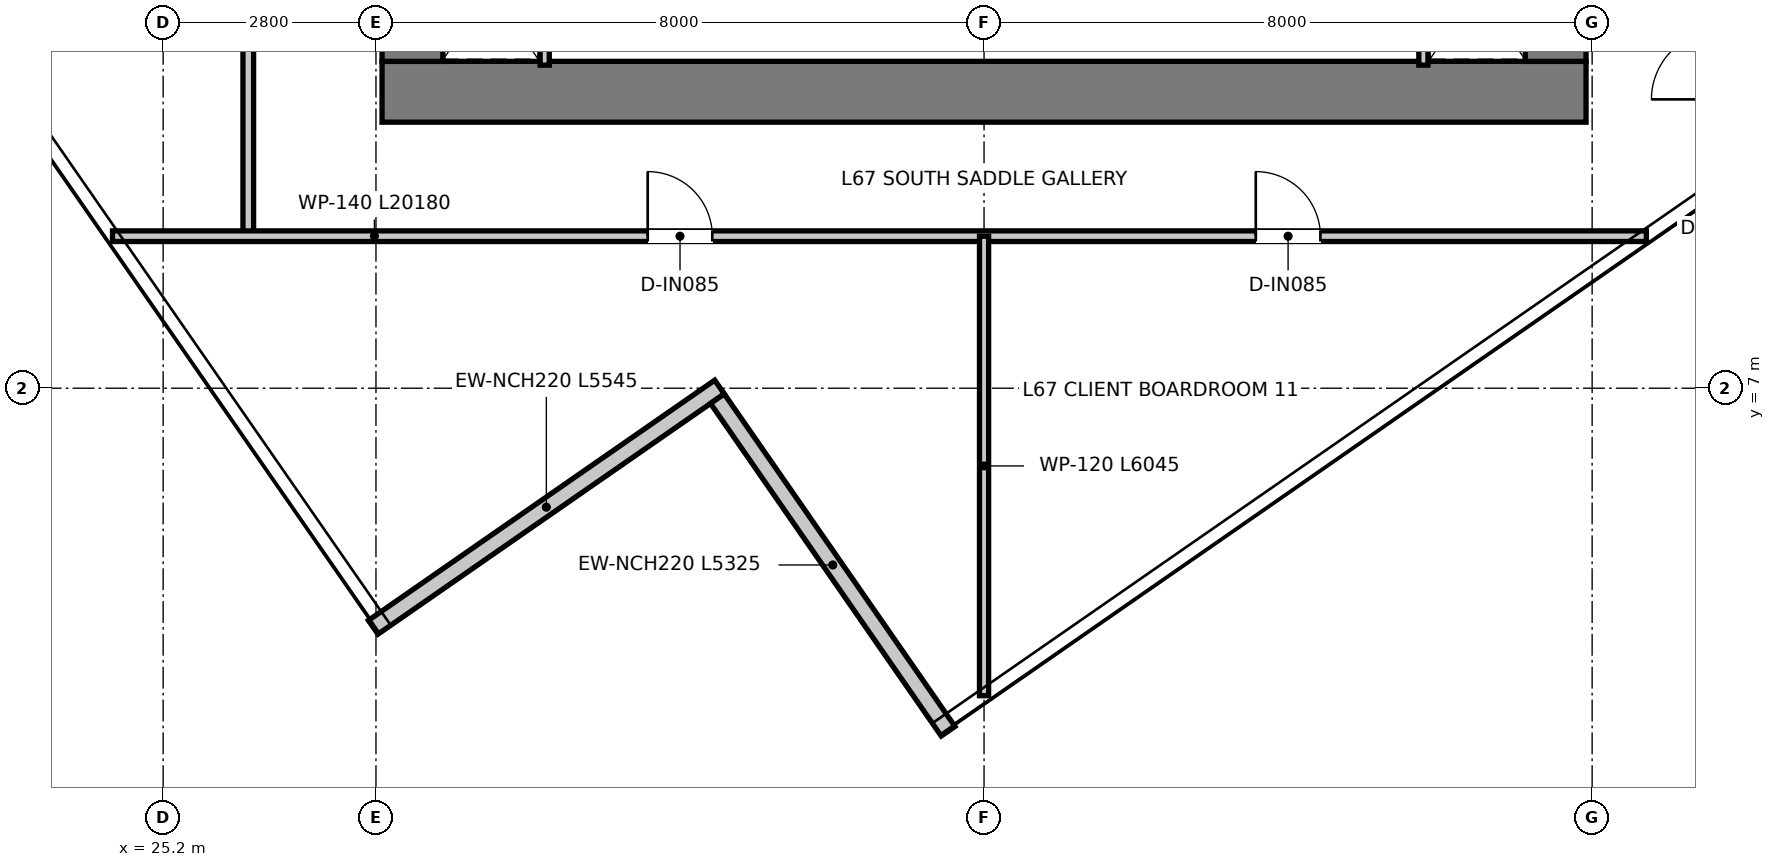
"""IFC4 building model, lengths in metres.
Left out: names, types, materials, properties, quantities, classifications, styles, units other than length and angle.
Written with IfcOpenShell. Run it as: python <this file> out.ifc"""

import sys

from ifc_helpers import new_model, si_unit, direction, frame, frame_2d, origin, place, context, subcontext, project, spatial, rectangle, extrude, element, fill, save


model = new_model("IFC4")
c1 = context("Model", 3, precision=1e-05, world=origin(), true_north=direction((0.0, 1.0)))
c2 = subcontext(c1, "Body", "Model", "MODEL_VIEW")
j1 = project(units=[si_unit("LENGTHUNIT", "METRE"), si_unit("PLANEANGLEUNIT", "RADIAN")], contexts=[c1])
p1 = place(None, origin())
s1 = spatial("IfcSite", under=j1, at=p1, CompositionType="ELEMENT")
p2 = place(p1, origin())
s2 = spatial("IfcBuilding", under=s1, at=p2, CompositionType="ELEMENT")
p3 = place(p2, frame((0.0, 0.0, 275.3)))
s3 = spatial("IfcBuildingStorey", under=s2, at=p3, CompositionType="ELEMENT", Elevation=275.3)
p4 = place(p3, frame((28.08, 10.9, 0.0), z_axis=(0.0, 0.0, 1.0), x_axis=(1.0, 0.0, 0.0)))
e1 = element("IfcWall", 1, at=p4, inside=s3, PredefinedType="SHEAR", context=c2, shape_type="SweptSolid", body=[
    extrude(rectangle(XDim=15.84, YDim=0.8, at=frame_2d((7.92, 0.0))), origin(), (0.0, 0.0, 1.0), 3.95),
])
for number, where, z_axis, x_axis in (
    (2, (28.48, 11.3, 0.0), (0.0, 0.0, 1.0), (0.0, 1.0, 0.0)),
    (3, (43.52, 11.3, 0.0), (0.0, 0.0, 1.0), (0.0, 1.0, 0.0)),
):
    element("IfcWall", number, at=place(p3, frame(where, z_axis=z_axis, x_axis=x_axis)), inside=s3, PredefinedType="SHEAR", context=c2, shape_type="SweptSolid", body=[
        extrude(rectangle(XDim=14.7, YDim=0.8, at=frame_2d((7.35, 0.0))), origin(), (0.0, 0.0, 1.0), 3.95),
    ])
p5 = place(p3, frame((27.963, 3.855, 0.0), z_axis=(0.0, 0.0, 1.0), x_axis=(0.821652918874, 0.569988141022, 0.0)))
e4 = element("IfcWall", 4, at=p5, inside=s3, PredefinedType="ELEMENTEDWALL", context=c2, shape_type="SweptSolid", body=[
    extrude(rectangle(XDim=5.545, YDim=0.22, at=frame_2d((2.772, 0.0))), origin(), (0.0, 0.0, 1.0), 3.67),
])
p6 = place(p3, frame((32.492, 6.862, 0.0), z_axis=(0.0, 0.0, 1.0), x_axis=(0.569998811791, -0.821645516361, 0.0)))
e5 = element("IfcWall", 5, at=p6, inside=s3, PredefinedType="ELEMENTEDWALL", context=c2, shape_type="SweptSolid", body=[
    extrude(rectangle(XDim=5.325, YDim=0.22, at=frame_2d((2.663, 0.0))), origin(), (0.0, 0.0, 1.0), 3.67),
])
for number, where, z_axis, x_axis in (
    (6, (30.22, 11.25, 0.0), (0.0, 0.0, 1.0), (0.0, 1.0, 0.0)),
    (7, (41.78, 11.25, 0.0), (0.0, 0.0, 1.0), (0.0, 1.0, 0.0)),
):
    element("IfcWall", number, at=place(p3, frame(where, z_axis=z_axis, x_axis=x_axis)), inside=s3, PredefinedType="PARTITIONING", context=c2, shape_type="SweptSolid", body=[
        extrude(rectangle(XDim=1.97, YDim=0.12, at=frame_2d((0.985, 0.0))), origin(), (0.0, 0.0, 1.0), 3.67),
    ])
p7 = place(p3, frame((26.32, 9.0, 0.0), z_axis=(0.0, 0.0, 1.0), x_axis=(0.0, 1.0, 0.0)))
e8 = element("IfcWall", 8, at=p7, inside=s3, PredefinedType="PARTITIONING", context=c2, shape_type="SweptSolid", body=[
    extrude(rectangle(XDim=19.66, YDim=0.14, at=frame_2d((9.83, 0.0))), origin(), (0.0, 0.0, 1.0), 3.13),
])
p8 = place(p7, frame((18.3, 0.0, 0.0)))
e9 = element("IfcOpeningElement", 9, at=p8, cuts=e8, PredefinedType="OPENING", context=c2, shape_type="SweptSolid", body=[
    extrude(rectangle(XDim=0.9, YDim=2.1, at=frame_2d((0.45, 1.05))), frame((0.0, 0.08, 0.0), z_axis=(0.0, -1.0, 0.0), x_axis=(1.0, 0.0, 0.0)), (0.0, 0.0, 1.0), 0.16),
])
p9 = place(p7, frame((9.8, 0.0, 0.0)))
e10 = element("IfcOpeningElement", 10, at=p9, cuts=e8, PredefinedType="OPENING", context=c2, shape_type="SweptSolid", body=[
    extrude(rectangle(XDim=0.9, YDim=2.1, at=frame_2d((0.45, 1.05))), frame((0.0, 0.08, 0.0), z_axis=(0.0, -1.0, 0.0), x_axis=(1.0, 0.0, 0.0)), (0.0, 0.0, 1.0), 0.16),
])
p10 = place(p7, frame((14.46, 0.0, 0.0)))
e11 = element("IfcOpeningElement", 11, at=p10, cuts=e8, PredefinedType="OPENING", context=c2, shape_type="SweptSolid", body=[
    extrude(rectangle(XDim=0.9, YDim=2.1, at=frame_2d((0.45, 1.05))), frame((0.0, 0.08, 0.0), z_axis=(0.0, -1.0, 0.0), x_axis=(1.0, 0.0, 0.0)), (0.0, 0.0, 1.0), 0.16),
])
p11 = place(p3, frame((24.534, 9.0, 0.0), z_axis=(0.0, 0.0, 1.0), x_axis=(1.0, 0.0, 0.0)))
e12 = element("IfcWall", 12, at=p11, inside=s3, PredefinedType="PARTITIONING", context=c2, shape_type="SweptSolid", body=[
    extrude(rectangle(XDim=20.18, YDim=0.14, at=frame_2d((10.09, 0.0))), origin(), (0.0, 0.0, 1.0), 3.67),
])
p12 = place(p11, frame((7.041, 0.0, 0.0)))
e13 = element("IfcOpeningElement", 13, at=p12, cuts=e12, PredefinedType="OPENING", context=c2, shape_type="SweptSolid", body=[
    extrude(rectangle(XDim=0.85, YDim=2.1, at=frame_2d((0.425, 1.05))), frame((0.0, 0.08, 0.0), z_axis=(0.0, -1.0, 0.0), x_axis=(1.0, 0.0, 0.0)), (0.0, 0.0, 1.0), 0.16),
])
p13 = place(p11, frame((15.041, 0.0, 0.0)))
e14 = element("IfcOpeningElement", 14, at=p13, cuts=e12, PredefinedType="OPENING", context=c2, shape_type="SweptSolid", body=[
    extrude(rectangle(XDim=0.85, YDim=2.1, at=frame_2d((0.425, 1.05))), frame((0.0, 0.08, 0.0), z_axis=(0.0, -1.0, 0.0), x_axis=(1.0, 0.0, 0.0)), (0.0, 0.0, 1.0), 0.16),
])
p14 = place(p3, frame((36.0, 2.955, 0.0), z_axis=(0.0, 0.0, 1.0), x_axis=(0.0, 1.0, 0.0)))
e15 = element("IfcWall", 15, at=p14, inside=s3, PredefinedType="PARTITIONING", context=c2, shape_type="SweptSolid", body=[
    extrude(rectangle(XDim=6.045, YDim=0.12, at=frame_2d((3.022, 0.0))), origin(), (0.0, 0.0, 1.0), 3.67),
])
p15 = place(p12, origin())
e16 = element("IfcDoor", 16, at=p15, inside=s3, OperationType="SINGLE_SWING_LEFT", PredefinedType="DOOR", context=c2, shape_type="SweptSolid", body=[
    extrude(rectangle(XDim=0.85, YDim=2.1, at=frame_2d((0.425, 1.05))), frame((0.0, 0.025, 0.0), z_axis=(0.0, -1.0, 0.0), x_axis=(1.0, 0.0, 0.0)), (0.0, 0.0, 1.0), 0.05),
])
fill(e13, e16)
p16 = place(p13, origin())
e17 = element("IfcDoor", 17, at=p16, inside=s3, OperationType="SINGLE_SWING_LEFT", PredefinedType="DOOR", context=c2, shape_type="SweptSolid", body=[
    extrude(rectangle(XDim=0.85, YDim=2.1, at=frame_2d((0.425, 1.05))), frame((0.0, 0.025, 0.0), z_axis=(0.0, -1.0, 0.0), x_axis=(1.0, 0.0, 0.0)), (0.0, 0.0, 1.0), 0.05),
])
fill(e14, e17)
save(model, sys.argv[1])
